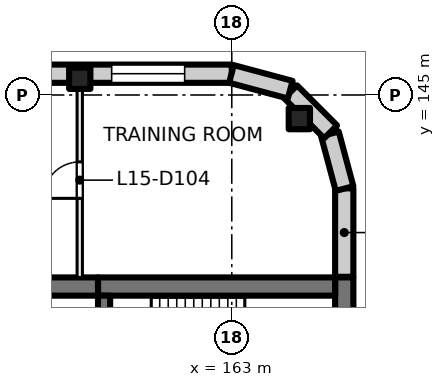
"""IFC4 building model, lengths in metres.
Left out: names, types, materials, properties, quantities, classifications, styles, units other than length and angle.
Written with IfcOpenShell. Run it as: python <this file> out.ifc"""

import sys

from ifc_helpers import new_model, si_unit, direction, frame, frame_2d, origin, origin_2d, place, context, subcontext, project, spatial, rectangle, extrude, element, fill, save


model = new_model("IFC4")
c1 = context("Model", 3, precision=1e-05, world=origin(), true_north=direction((0.0, 1.0)))
c2 = subcontext(c1, "Body", "Model", "MODEL_VIEW")
j1 = project(units=[si_unit("LENGTHUNIT", "METRE"), si_unit("PLANEANGLEUNIT", "RADIAN")], contexts=[c1])
p1 = place(None, origin())
s1 = spatial("IfcSite", under=j1, at=p1, CompositionType="ELEMENT")
p2 = place(p1, origin())
s2 = spatial("IfcBuilding", under=s1, at=p2, CompositionType="ELEMENT")
p3 = place(p2, frame((0.0, 0.0, 67.5)))
s3 = spatial("IfcBuildingStorey", under=s2, at=p3, CompositionType="ELEMENT", Elevation=67.5)
for number, where, z_axis, x_axis in (
    (1, (165.223, 144.223, 0.0), (0.0, 0.0, 1.0), (1.0, 0.0, 0.0)),
    (2, (158.0, 145.55, 0.0), (0.0, 0.0, 1.0), (1.0, 0.0, 0.0)),
):
    element("IfcColumn", number, at=place(p3, frame(where, z_axis=z_axis, x_axis=x_axis)), inside=s3, PredefinedType="COLUMN", context=c2, shape_type="SweptSolid", body=[
        extrude(rectangle(XDim=0.7, YDim=0.7, at=origin_2d()), origin(), (0.0, 0.0, 1.0), 4.0),
    ])
p4 = place(p3, frame((166.7, 139.0, 0.0), z_axis=(0.0, 0.0, 1.0), x_axis=(0.0, -1.0, 0.0)))
e3 = element("IfcWall", 3, at=p4, inside=s3, PredefinedType="SHEAR", context=c2, shape_type="SweptSolid", body=[
    extrude(rectangle(XDim=3.8, YDim=0.6, at=frame_2d((1.9, 0.0))), origin(), (0.0, 0.0, 1.0), 4.0),
])
p5 = place(p3, frame((166.4, 138.7, 0.0), z_axis=(0.0, 0.0, 1.0), x_axis=(-1.0, 0.0, 0.0)))
e4 = element("IfcWall", 4, at=p5, inside=s3, PredefinedType="SHEAR", context=c2, shape_type="SweptSolid", body=[
    extrude(rectangle(XDim=7.8, YDim=0.6, at=frame_2d((3.9, 0.0))), origin(), (0.0, 0.0, 1.0), 4.0),
])
p6 = place(p3, frame((158.6, 138.7, 0.0), z_axis=(0.0, 0.0, 1.0), x_axis=(-1.0, 0.0, 0.0)))
e5 = element("IfcWall", 5, at=p6, inside=s3, PredefinedType="SHEAR", context=c2, shape_type="SweptSolid", body=[
    extrude(rectangle(XDim=4.6, YDim=0.6, at=frame_2d((2.3, 0.0))), origin(), (0.0, 0.0, 1.0), 4.0),
])
p7 = place(p3, frame((158.8, 138.4, 0.0), z_axis=(0.0, 0.0, 1.0), x_axis=(0.0, -1.0, 0.0)))
e6 = element("IfcWall", 6, at=p7, inside=s3, PredefinedType="SHEAR", context=c2, shape_type="SweptSolid", body=[
    extrude(rectangle(XDim=2.8, YDim=0.4, at=frame_2d((1.4, 0.0))), origin(), (0.0, 0.0, 1.0), 4.0),
])
p8 = place(p7, frame((0.9, 0.0, 0.0)))
e7 = element("IfcOpeningElement", 7, at=p8, cuts=e6, PredefinedType="OPENING", context=c2, shape_type="SweptSolid", body=[
    extrude(rectangle(XDim=1.0, YDim=2.1, at=frame_2d((0.5, 1.05))), frame((0.0, 0.21, 0.0), z_axis=(0.0, -1.0, 0.0), x_axis=(1.0, 0.0, 0.0)), (0.0, 0.0, 1.0), 0.42),
])
p9 = place(p3, frame((131.07, 145.7, 0.0), z_axis=(0.0, 0.0, 1.0), x_axis=(1.0, 0.0, 0.0)))
e8 = element("IfcWall", 8, at=p9, inside=s3, PredefinedType="SOLIDWALL", context=c2, shape_type="SweptSolid", body=[
    extrude(rectangle(XDim=31.93, YDim=0.6, at=frame_2d((15.965, 0.0))), origin(), (0.0, 0.0, 1.0), 3.625),
])
p10 = place(p9, frame((0.98, 0.0, 0.9)))
e9 = element("IfcOpeningElement", 9, at=p10, cuts=e8, PredefinedType="OPENING", context=c2, shape_type="SweptSolid", body=[
    extrude(rectangle(XDim=2.4, YDim=2.4, at=frame_2d((1.2, 1.2))), frame((0.0, 0.31, 0.0), z_axis=(0.0, -1.0, 0.0), x_axis=(1.0, 0.0, 0.0)), (0.0, 0.0, 1.0), 0.62),
])
p11 = place(p9, frame((5.48, 0.0, 0.9)))
e10 = element("IfcOpeningElement", 10, at=p11, cuts=e8, PredefinedType="OPENING", context=c2, shape_type="SweptSolid", body=[
    extrude(rectangle(XDim=2.4, YDim=2.4, at=frame_2d((1.2, 1.2))), frame((0.0, 0.31, 0.0), z_axis=(0.0, -1.0, 0.0), x_axis=(1.0, 0.0, 0.0)), (0.0, 0.0, 1.0), 0.62),
])
p12 = place(p9, frame((9.98, 0.0, 0.9)))
e11 = element("IfcOpeningElement", 11, at=p12, cuts=e8, PredefinedType="OPENING", context=c2, shape_type="SweptSolid", body=[
    extrude(rectangle(XDim=2.4, YDim=2.4, at=frame_2d((1.2, 1.2))), frame((0.0, 0.31, 0.0), z_axis=(0.0, -1.0, 0.0), x_axis=(1.0, 0.0, 0.0)), (0.0, 0.0, 1.0), 0.62),
])
p13 = place(p9, frame((14.48, 0.0, 0.9)))
e12 = element("IfcOpeningElement", 12, at=p13, cuts=e8, PredefinedType="OPENING", context=c2, shape_type="SweptSolid", body=[
    extrude(rectangle(XDim=2.4, YDim=2.4, at=frame_2d((1.2, 1.2))), frame((0.0, 0.31, 0.0), z_axis=(0.0, -1.0, 0.0), x_axis=(1.0, 0.0, 0.0)), (0.0, 0.0, 1.0), 0.62),
])
p14 = place(p9, frame((18.98, 0.0, 0.9)))
e13 = element("IfcOpeningElement", 13, at=p14, cuts=e8, PredefinedType="OPENING", context=c2, shape_type="SweptSolid", body=[
    extrude(rectangle(XDim=2.4, YDim=2.4, at=frame_2d((1.2, 1.2))), frame((0.0, 0.31, 0.0), z_axis=(0.0, -1.0, 0.0), x_axis=(1.0, 0.0, 0.0)), (0.0, 0.0, 1.0), 0.62),
])
p15 = place(p9, frame((23.48, 0.0, 0.9)))
e14 = element("IfcOpeningElement", 14, at=p15, cuts=e8, PredefinedType="OPENING", context=c2, shape_type="SweptSolid", body=[
    extrude(rectangle(XDim=2.4, YDim=2.4, at=frame_2d((1.2, 1.2))), frame((0.0, 0.31, 0.0), z_axis=(0.0, -1.0, 0.0), x_axis=(1.0, 0.0, 0.0)), (0.0, 0.0, 1.0), 0.62),
])
p16 = place(p9, frame((27.98, 0.0, 0.9)))
e15 = element("IfcOpeningElement", 15, at=p16, cuts=e8, PredefinedType="OPENING", context=c2, shape_type="SweptSolid", body=[
    extrude(rectangle(XDim=2.4, YDim=2.4, at=frame_2d((1.2, 1.2))), frame((0.0, 0.31, 0.0), z_axis=(0.0, -1.0, 0.0), x_axis=(1.0, 0.0, 0.0)), (0.0, 0.0, 1.0), 0.62),
])
p17 = place(p3, frame((166.7, 141.93, 0.0), z_axis=(0.0, 0.0, 1.0), x_axis=(0.0, -1.0, 0.0)))
e16 = element("IfcWall", 16, at=p17, inside=s3, PredefinedType="SOLIDWALL", context=c2, shape_type="SweptSolid", body=[
    extrude(rectangle(XDim=2.91, YDim=0.6, at=frame_2d((1.455, 0.0))), origin(), (0.0, 0.0, 1.0), 3.625),
])
for number, where, z_axis, x_axis in (
    (17, (166.229, 143.719, 0.0), (0.0, 0.0, 1.0), (0.259, -0.966, 0.0)),
    (18, (164.936, 145.104, 0.0), (0.0, 0.0, 1.0), (0.707, -0.707, 0.0)),
):
    element("IfcWall", number, at=place(p3, frame(where, z_axis=z_axis, x_axis=x_axis)), inside=s3, PredefinedType="SOLIDWALL", context=c2, shape_type="SweptSolid", body=[
        extrude(rectangle(XDim=1.861, YDim=0.6, at=frame_2d((0.93, 0.0))), origin(), (0.0, 0.0, 1.0), 3.625),
    ])
p18 = place(p3, frame((162.99, 145.692, 0.0), z_axis=(0.0, 0.0, 1.0), x_axis=(0.965920269068, -0.258839784042, 0.0)))
e19 = element("IfcWall", 19, at=p18, inside=s3, PredefinedType="SOLIDWALL", context=c2, shape_type="SweptSolid", body=[
    extrude(rectangle(XDim=2.0, YDim=0.6, at=frame_2d((1.0, 0.0))), origin(), (0.0, 0.0, 1.0), 3.625),
])
p19 = place(p3, frame((158.0, 139.0, 0.0), z_axis=(0.0, 0.0, 1.0), x_axis=(0.0, 1.0, 0.0)))
e20 = element("IfcWall", 20, at=p19, inside=s3, PredefinedType="PARTITIONING", context=c2, shape_type="SweptSolid", body=[
    extrude(rectangle(XDim=6.4, YDim=0.175, at=frame_2d((3.2, 0.0))), origin(), (0.0, 0.0, 1.0), 3.625),
])
p20 = place(p19, frame((2.6, 0.0, 0.0)))
e21 = element("IfcOpeningElement", 21, at=p20, cuts=e20, PredefinedType="OPENING", context=c2, shape_type="SweptSolid", body=[
    extrude(rectangle(XDim=1.2, YDim=2.1, at=frame_2d((0.6, 1.05))), frame((0.0, 0.097, 0.0), z_axis=(0.0, -1.0, 0.0), x_axis=(1.0, 0.0, 0.0)), (0.0, 0.0, 1.0), 0.195),
])
p21 = place(p16, origin())
e22 = element("IfcWindow", 22, at=p21, inside=s3, PartitioningType="SINGLE_PANEL", PredefinedType="WINDOW", context=c2, shape_type="SweptSolid", body=[
    extrude(rectangle(XDim=2.4, YDim=2.4, at=frame_2d((1.2, 1.2))), frame((0.0, 0.03, 0.0), z_axis=(0.0, -1.0, 0.0), x_axis=(1.0, 0.0, 0.0)), (0.0, 0.0, 1.0), 0.06),
])
fill(e15, e22)
p22 = place(p20, origin())
e23 = element("IfcDoor", 23, at=p22, inside=s3, OperationType="DOUBLE_DOOR_SINGLE_SWING", PredefinedType="DOOR", context=c2, shape_type="SweptSolid", body=[
    extrude(rectangle(XDim=1.2, YDim=2.1, at=frame_2d((0.6, 1.05))), frame((0.0, 0.025, 0.0), z_axis=(0.0, -1.0, 0.0), x_axis=(1.0, 0.0, 0.0)), (0.0, 0.0, 1.0), 0.05),
])
fill(e21, e23)
save(model, sys.argv[1])
